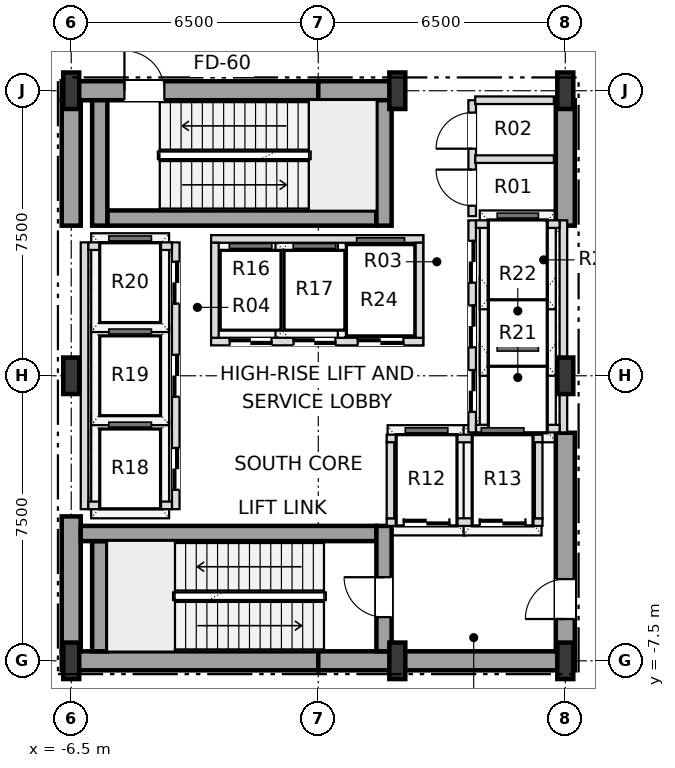
"""IFC4 building model, lengths in metres.
Left out: names, types, materials, properties, quantities, classifications, styles, units other than length and angle.
Written with IfcOpenShell. Run it as: python <this file> out.ifc"""

import sys

from ifc_helpers import new_model, si_unit, direction, frame, frame_2d, origin, origin_2d, place, context, subcontext, project, spatial, rectangle, i_section, extrude, element, fill, save


model = new_model("IFC4")
c1 = context("Model", 3, precision=1e-05, world=origin(), true_north=direction((0.0, 1.0)))
c2 = subcontext(c1, "Body", "Model", "MODEL_VIEW")
j1 = project(units=[si_unit("LENGTHUNIT", "METRE"), si_unit("PLANEANGLEUNIT", "RADIAN")], contexts=[c1])
p1 = place(None, origin())
s1 = spatial("IfcSite", under=j1, at=p1, CompositionType="ELEMENT")
p2 = place(p1, origin())
s2 = spatial("IfcBuilding", under=s1, at=p2, CompositionType="ELEMENT")
p3 = place(p2, frame((0.0, 0.0, 11.4)))
s3 = spatial("IfcBuildingStorey", under=s2, at=p3, CompositionType="ELEMENT", Elevation=11.4)
for number, where, z_axis, x_axis in (
    (1, (-6.5, -7.5, 0.0), (0.0, 0.0, 1.0), (1.0, 0.0, 0.0)),
    (2, (2.08, -7.5, 0.0), (0.0, 0.0, 1.0), (1.0, 0.0, 0.0)),
    (3, (6.5, -7.5, 0.0), (0.0, 0.0, 1.0), (1.0, 0.0, 0.0)),
    (4, (-6.5, 0.0, 0.0), (0.0, 0.0, 1.0), (1.0, 0.0, 0.0)),
    (5, (6.5, 0.0, 0.0), (0.0, 0.0, 1.0), (1.0, 0.0, 0.0)),
    (6, (-6.5, 7.5, 0.0), (0.0, 0.0, 1.0), (1.0, 0.0, 0.0)),
    (7, (2.08, 7.5, 0.0), (0.0, 0.0, 1.0), (1.0, 0.0, 0.0)),
    (8, (6.5, 7.5, 0.0), (0.0, 0.0, 1.0), (1.0, 0.0, 0.0)),
):
    element("IfcColumn", number, at=place(p3, frame(where, z_axis=z_axis, x_axis=x_axis)), inside=s3, PredefinedType="COLUMN", context=c2, shape_type="SweptSolid", body=[
        extrude(i_section(OverallWidth=0.42, OverallDepth=0.96, WebThickness=0.022, FlangeThickness=0.034, at=origin_2d()), origin(), (0.0, 0.0, 1.0), 5.4),
    ])
for number, where, z_axis, x_axis in (
    (9, (-6.75, -7.5, 0.0), (0.0, 0.0, 1.0), (1.0, 0.0, 0.0)),
    (10, (0.0, -7.5, 0.0), (0.0, 0.0, 1.0), (1.0, 0.0, 0.0)),
):
    element("IfcWall", number, at=place(p3, frame(where, z_axis=z_axis, x_axis=x_axis)), inside=s3, PredefinedType="SHEAR", context=c2, shape_type="SweptSolid", body=[
        extrude(rectangle(XDim=6.75, YDim=0.5, at=frame_2d((3.375, 0.0))), origin(), (0.0, 0.0, 1.0), 5.12),
    ])
p4 = place(p3, frame((-6.75, 7.5, 0.0), z_axis=(0.0, 0.0, 1.0), x_axis=(1.0, 0.0, 0.0)))
e11 = element("IfcWall", 11, at=p4, inside=s3, PredefinedType="SHEAR", context=c2, shape_type="SweptSolid", body=[
    extrude(rectangle(XDim=6.75, YDim=0.5, at=frame_2d((3.375, 0.0))), origin(), (0.0, 0.0, 1.0), 5.12),
])
p5 = place(p4, frame((1.65, 0.0, 0.0)))
e12 = element("IfcOpeningElement", 12, at=p5, cuts=e11, PredefinedType="OPENING", context=c2, shape_type="SweptSolid", body=[
    extrude(rectangle(XDim=1.05, YDim=2.15, at=frame_2d((0.525, 1.075))), frame((0.0, 0.26, 0.0), z_axis=(0.0, -1.0, 0.0), x_axis=(1.0, 0.0, 0.0)), (0.0, 0.0, 1.0), 0.52),
])
p6 = place(p3, frame((0.0, 7.5, 0.0), z_axis=(0.0, 0.0, 1.0), x_axis=(1.0, 0.0, 0.0)))
e13 = element("IfcWall", 13, at=p6, inside=s3, PredefinedType="SHEAR", context=c2, shape_type="SweptSolid", body=[
    extrude(rectangle(XDim=2.08, YDim=0.5, at=frame_2d((1.04, 0.0))), origin(), (0.0, 0.0, 1.0), 5.12),
])
p7 = place(p3, frame((-6.5, -7.25, 0.0), z_axis=(0.0, 0.0, 1.0), x_axis=(0.0, 1.0, 0.0)))
e14 = element("IfcWall", 14, at=p7, inside=s3, PredefinedType="SHEAR", context=c2, shape_type="SweptSolid", body=[
    extrude(rectangle(XDim=3.55, YDim=0.5, at=frame_2d((1.775, 0.0))), origin(), (0.0, 0.0, 1.0), 5.12),
])
p8 = place(p3, frame((-6.5, 3.95, 0.0), z_axis=(0.0, 0.0, 1.0), x_axis=(0.0, 1.0, 0.0)))
e15 = element("IfcWall", 15, at=p8, inside=s3, PredefinedType="SHEAR", context=c2, shape_type="SweptSolid", body=[
    extrude(rectangle(XDim=3.3, YDim=0.5, at=frame_2d((1.65, 0.0))), origin(), (0.0, 0.0, 1.0), 5.12),
])
p9 = place(p3, frame((6.5, -7.25, 0.0), z_axis=(0.0, 0.0, 1.0), x_axis=(0.0, 1.0, 0.0)))
e16 = element("IfcWall", 16, at=p9, inside=s3, PredefinedType="SHEAR", context=c2, shape_type="SweptSolid", body=[
    extrude(rectangle(XDim=5.75, YDim=0.5, at=frame_2d((2.875, 0.0))), origin(), (0.0, 0.0, 1.0), 5.12),
])
p10 = place(p9, frame((0.85, 0.0, 0.0)))
e17 = element("IfcOpeningElement", 17, at=p10, cuts=e16, PredefinedType="OPENING", context=c2, shape_type="SweptSolid", body=[
    extrude(rectangle(XDim=1.05, YDim=2.15, at=frame_2d((0.525, 1.075))), frame((0.0, 0.26, 0.0), z_axis=(0.0, -1.0, 0.0), x_axis=(1.0, 0.0, 0.0)), (0.0, 0.0, 1.0), 0.52),
])
p11 = place(p3, frame((6.5, 3.95, 0.0), z_axis=(0.0, 0.0, 1.0), x_axis=(0.0, 1.0, 0.0)))
e18 = element("IfcWall", 18, at=p11, inside=s3, PredefinedType="SHEAR", context=c2, shape_type="SweptSolid", body=[
    extrude(rectangle(XDim=3.3, YDim=0.5, at=frame_2d((1.65, 0.0))), origin(), (0.0, 0.0, 1.0), 5.12),
])
p12 = place(p3, frame((-5.75, -7.25, 0.0), z_axis=(0.0, 0.0, 1.0), x_axis=(0.0, 1.0, 0.0)))
e19 = element("IfcWall", 19, at=p12, inside=s3, PredefinedType="SHEAR", context=c2, shape_type="SweptSolid", body=[
    extrude(rectangle(XDim=2.9, YDim=0.4, at=frame_2d((1.45, 0.0))), origin(), (0.0, 0.0, 1.0), 5.12),
])
p13 = place(p3, frame((-6.25, -4.15, 0.0), z_axis=(0.0, 0.0, 1.0), x_axis=(1.0, 0.0, 0.0)))
e20 = element("IfcWall", 20, at=p13, inside=s3, PredefinedType="SHEAR", context=c2, shape_type="SweptSolid", body=[
    extrude(rectangle(XDim=7.78, YDim=0.4, at=frame_2d((3.89, 0.0))), origin(), (0.0, 0.0, 1.0), 5.12),
])
p14 = place(p3, frame((1.73, -7.25, 0.0), z_axis=(0.0, 0.0, 1.0), x_axis=(0.0, 1.0, 0.0)))
e21 = element("IfcWall", 21, at=p14, inside=s3, PredefinedType="SHEAR", context=c2, shape_type="SweptSolid", body=[
    extrude(rectangle(XDim=3.3, YDim=0.4, at=frame_2d((1.65, 0.0))), origin(), (0.0, 0.0, 1.0), 5.12),
])
p15 = place(p14, frame((0.9, 0.0, 0.0)))
e22 = element("IfcOpeningElement", 22, at=p15, cuts=e21, PredefinedType="OPENING", context=c2, shape_type="SweptSolid", body=[
    extrude(rectangle(XDim=1.05, YDim=2.15, at=frame_2d((0.525, 1.075))), frame((0.0, 0.21, 0.0), z_axis=(0.0, -1.0, 0.0), x_axis=(1.0, 0.0, 0.0)), (0.0, 0.0, 1.0), 0.42),
])
p16 = place(p3, frame((-5.55, 4.15, 0.0), z_axis=(0.0, 0.0, 1.0), x_axis=(1.0, 0.0, 0.0)))
e23 = element("IfcWall", 23, at=p16, inside=s3, PredefinedType="SHEAR", context=c2, shape_type="SweptSolid", body=[
    extrude(rectangle(XDim=7.08, YDim=0.4, at=frame_2d((3.54, 0.0))), origin(), (0.0, 0.0, 1.0), 5.12),
])
for number, where, z_axis, x_axis in (
    (24, (1.73, 3.95, 0.0), (0.0, 0.0, 1.0), (0.0, 1.0, 0.0)),
    (25, (-5.75, 3.95, 0.0), (0.0, 0.0, 1.0), (0.0, 1.0, 0.0)),
):
    element("IfcWall", number, at=place(p3, frame(where, z_axis=z_axis, x_axis=x_axis)), inside=s3, PredefinedType="SHEAR", context=c2, shape_type="SweptSolid", body=[
        extrude(rectangle(XDim=3.3, YDim=0.4, at=frame_2d((1.65, 0.0))), origin(), (0.0, 0.0, 1.0), 5.12),
    ])
p17 = place(p3, frame((-3.75, -3.51, 0.0), z_axis=(0.0, 0.0, 1.0), x_axis=(0.0, 1.0, 0.0)))
e26 = element("IfcWall", 26, at=p17, inside=s3, PredefinedType="SOLIDWALL", context=c2, shape_type="SweptSolid", body=[
    extrude(rectangle(XDim=7.02, YDim=0.2, at=frame_2d((3.51, 0.0))), origin(), (0.0, 0.0, 1.0), 5.12),
])
p18 = place(p17, frame((0.51, 0.0, 0.0)))
e27 = element("IfcOpeningElement", 27, at=p18, cuts=e26, PredefinedType="OPENING", context=c2, shape_type="SweptSolid", body=[
    extrude(rectangle(XDim=1.1, YDim=2.15, at=frame_2d((0.55, 1.075))), frame((0.0, 0.11, 0.0), z_axis=(0.0, -1.0, 0.0), x_axis=(1.0, 0.0, 0.0)), (0.0, 0.0, 1.0), 0.22),
])
p19 = place(p17, frame((2.96, 0.0, 0.0)))
e28 = element("IfcOpeningElement", 28, at=p19, cuts=e26, PredefinedType="OPENING", context=c2, shape_type="SweptSolid", body=[
    extrude(rectangle(XDim=1.1, YDim=2.15, at=frame_2d((0.55, 1.075))), frame((0.0, 0.11, 0.0), z_axis=(0.0, -1.0, 0.0), x_axis=(1.0, 0.0, 0.0)), (0.0, 0.0, 1.0), 0.22),
])
p20 = place(p17, frame((5.41, 0.0, 0.0)))
e29 = element("IfcOpeningElement", 29, at=p20, cuts=e26, PredefinedType="OPENING", context=c2, shape_type="SweptSolid", body=[
    extrude(rectangle(XDim=1.1, YDim=2.15, at=frame_2d((0.55, 1.075))), frame((0.0, 0.11, 0.0), z_axis=(0.0, -1.0, 0.0), x_axis=(1.0, 0.0, 0.0)), (0.0, 0.0, 1.0), 0.22),
])
p21 = place(p3, frame((-6.15, -3.51, 0.0), z_axis=(0.0, 0.0, 1.0), x_axis=(0.0, 1.0, 0.0)))
e30 = element("IfcWall", 30, at=p21, inside=s3, PredefinedType="SOLIDWALL", context=c2, shape_type="SweptSolid", body=[
    extrude(rectangle(XDim=7.02, YDim=0.2, at=frame_2d((3.51, 0.0))), origin(), (0.0, 0.0, 1.0), 5.12),
])
for number, where, z_axis, x_axis in (
    (31, (-6.05, -3.41, 0.0), (0.0, 0.0, 1.0), (1.0, 0.0, 0.0)),
    (32, (-6.05, 3.41, 0.0), (0.0, 0.0, 1.0), (1.0, 0.0, 0.0)),
):
    element("IfcWall", number, at=place(p3, frame(where, z_axis=z_axis, x_axis=x_axis)), inside=s3, PredefinedType="SOLIDWALL", context=c2, shape_type="SweptSolid", body=[
        extrude(rectangle(XDim=2.2, YDim=0.2, at=frame_2d((1.1, 0.0))), origin(), (0.0, 0.0, 1.0), 5.12),
    ])
p22 = place(p3, frame((4.05, -1.49, 0.0), z_axis=(0.0, 0.0, 1.0), x_axis=(0.0, 1.0, 0.0)))
e33 = element("IfcWall", 33, at=p22, inside=s3, PredefinedType="SOLIDWALL", context=c2, shape_type="SweptSolid", body=[
    extrude(rectangle(XDim=5.58, YDim=0.2, at=frame_2d((2.79, 0.0))), origin(), (0.0, 0.0, 1.0), 5.12),
])
p23 = place(p22, frame((0.54, 0.0, 0.0)))
e34 = element("IfcOpeningElement", 34, at=p23, cuts=e33, PredefinedType="OPENING", context=c2, shape_type="SweptSolid", body=[
    extrude(rectangle(XDim=1.1, YDim=2.15, at=frame_2d((0.55, 1.075))), frame((0.0, 0.11, 0.0), z_axis=(0.0, -1.0, 0.0), x_axis=(1.0, 0.0, 0.0)), (0.0, 0.0, 1.0), 0.22),
])
p24 = place(p22, frame((2.24, 0.0, 0.0)))
e35 = element("IfcOpeningElement", 35, at=p24, cuts=e33, PredefinedType="OPENING", context=c2, shape_type="SweptSolid", body=[
    extrude(rectangle(XDim=1.1, YDim=2.15, at=frame_2d((0.55, 1.075))), frame((0.0, 0.11, 0.0), z_axis=(0.0, -1.0, 0.0), x_axis=(1.0, 0.0, 0.0)), (0.0, 0.0, 1.0), 0.22),
])
p25 = place(p22, frame((3.94, 0.0, 0.0)))
e36 = element("IfcOpeningElement", 36, at=p25, cuts=e33, PredefinedType="OPENING", context=c2, shape_type="SweptSolid", body=[
    extrude(rectangle(XDim=1.1, YDim=2.15, at=frame_2d((0.55, 1.075))), frame((0.0, 0.11, 0.0), z_axis=(0.0, -1.0, 0.0), x_axis=(1.0, 0.0, 0.0)), (0.0, 0.0, 1.0), 0.22),
])
p26 = place(p3, frame((6.45, -1.49, 0.0), z_axis=(0.0, 0.0, 1.0), x_axis=(0.0, 1.0, 0.0)))
e37 = element("IfcWall", 37, at=p26, inside=s3, PredefinedType="SOLIDWALL", context=c2, shape_type="SweptSolid", body=[
    extrude(rectangle(XDim=5.58, YDim=0.2, at=frame_2d((2.79, 0.0))), origin(), (0.0, 0.0, 1.0), 4.41),
])
for number, where, z_axis, x_axis in (
    (38, (4.15, -1.39, 0.0), (0.0, 0.0, 1.0), (1.0, 0.0, 0.0)),
    (39, (4.15, 3.99, 0.0), (0.0, 0.0, 1.0), (1.0, 0.0, 0.0)),
):
    element("IfcWall", number, at=place(p3, frame(where, z_axis=z_axis, x_axis=x_axis)), inside=s3, PredefinedType="SOLIDWALL", context=c2, shape_type="SweptSolid", body=[
        extrude(rectangle(XDim=2.2, YDim=0.2, at=frame_2d((1.1, 0.0))), origin(), (0.0, 0.0, 1.0), 5.12),
    ])
p27 = place(p3, frame((-2.82, 0.9, 0.0), z_axis=(0.0, 0.0, 1.0), x_axis=(1.0, 0.0, 0.0)))
e40 = element("IfcWall", 40, at=p27, inside=s3, PredefinedType="SOLIDWALL", context=c2, shape_type="SweptSolid", body=[
    extrude(rectangle(XDim=5.58, YDim=0.2, at=frame_2d((2.79, 0.0))), origin(), (0.0, 0.0, 1.0), 5.12),
])
p28 = place(p27, frame((0.49, 0.0, 0.0)))
e41 = element("IfcOpeningElement", 41, at=p28, cuts=e40, PredefinedType="OPENING", context=c2, shape_type="SweptSolid", body=[
    extrude(rectangle(XDim=1.1, YDim=2.15, at=frame_2d((0.55, 1.075))), frame((0.0, 0.11, 0.0), z_axis=(0.0, -1.0, 0.0), x_axis=(1.0, 0.0, 0.0)), (0.0, 0.0, 1.0), 0.22),
])
p29 = place(p27, frame((2.17, 0.0, 0.0)))
e42 = element("IfcOpeningElement", 42, at=p29, cuts=e40, PredefinedType="OPENING", context=c2, shape_type="SweptSolid", body=[
    extrude(rectangle(XDim=1.1, YDim=2.15, at=frame_2d((0.55, 1.075))), frame((0.0, 0.11, 0.0), z_axis=(0.0, -1.0, 0.0), x_axis=(1.0, 0.0, 0.0)), (0.0, 0.0, 1.0), 0.22),
])
p30 = place(p27, frame((3.86, 0.0, 0.0)))
e43 = element("IfcOpeningElement", 43, at=p30, cuts=e40, PredefinedType="OPENING", context=c2, shape_type="SweptSolid", body=[
    extrude(rectangle(XDim=1.2, YDim=2.2, at=frame_2d((0.6, 1.1))), frame((0.0, 0.11, 0.0), z_axis=(0.0, -1.0, 0.0), x_axis=(1.0, 0.0, 0.0)), (0.0, 0.0, 1.0), 0.22),
])
p31 = place(p3, frame((-2.82, 3.6, 0.0), z_axis=(0.0, 0.0, 1.0), x_axis=(1.0, 0.0, 0.0)))
e44 = element("IfcWall", 44, at=p31, inside=s3, PredefinedType="SOLIDWALL", context=c2, shape_type="SweptSolid", body=[
    extrude(rectangle(XDim=5.58, YDim=0.2, at=frame_2d((2.79, 0.0))), origin(), (0.0, 0.0, 1.0), 5.12),
])
for number, where, z_axis, x_axis in (
    (45, (-2.72, 1.0, 0.0), (0.0, 0.0, 1.0), (0.0, 1.0, 0.0)),
    (46, (2.66, 1.0, 0.0), (0.0, 0.0, 1.0), (0.0, 1.0, 0.0)),
):
    element("IfcWall", number, at=place(p3, frame(where, z_axis=z_axis, x_axis=x_axis)), inside=s3, PredefinedType="SOLIDWALL", context=c2, shape_type="SweptSolid", body=[
        extrude(rectangle(XDim=2.5, YDim=0.2, at=frame_2d((1.25, 0.0))), origin(), (0.0, 0.0, 1.0), 5.12),
    ])
p32 = place(p3, frame((1.8, -3.85, 0.0), z_axis=(0.0, 0.0, 1.0), x_axis=(1.0, 0.0, 0.0)))
e47 = element("IfcWall", 47, at=p32, inside=s3, PredefinedType="SOLIDWALL", context=c2, shape_type="SweptSolid", body=[
    extrude(rectangle(XDim=4.1, YDim=0.2, at=frame_2d((2.05, 0.0))), origin(), (0.0, 0.0, 1.0), 5.12),
])
p33 = place(p32, frame((0.45, 0.0, 0.0)))
e48 = element("IfcOpeningElement", 48, at=p33, cuts=e47, PredefinedType="OPENING", context=c2, shape_type="SweptSolid", body=[
    extrude(rectangle(XDim=1.2, YDim=2.2, at=frame_2d((0.6, 1.1))), frame((0.0, 0.11, 0.0), z_axis=(0.0, -1.0, 0.0), x_axis=(1.0, 0.0, 0.0)), (0.0, 0.0, 1.0), 0.22),
])
p34 = place(p32, frame((2.45, 0.0, 0.0)))
e49 = element("IfcOpeningElement", 49, at=p34, cuts=e47, PredefinedType="OPENING", context=c2, shape_type="SweptSolid", body=[
    extrude(rectangle(XDim=1.2, YDim=2.2, at=frame_2d((0.6, 1.1))), frame((0.0, 0.11, 0.0), z_axis=(0.0, -1.0, 0.0), x_axis=(1.0, 0.0, 0.0)), (0.0, 0.0, 1.0), 0.22),
])
p35 = place(p3, frame((1.8, -1.65, 0.0), z_axis=(0.0, 0.0, 1.0), x_axis=(1.0, 0.0, 0.0)))
e50 = element("IfcWall", 50, at=p35, inside=s3, PredefinedType="SOLIDWALL", context=c2, shape_type="SweptSolid", body=[
    extrude(rectangle(XDim=4.1, YDim=0.2, at=frame_2d((2.05, 0.0))), origin(), (0.0, 0.0, 1.0), 5.12),
])
for number, where, z_axis, x_axis in (
    (51, (1.9, -3.75, 0.0), (0.0, 0.0, 1.0), (0.0, 1.0, 0.0)),
    (52, (5.8, -3.75, 0.0), (0.0, 0.0, 1.0), (0.0, 1.0, 0.0)),
):
    element("IfcWall", number, at=place(p3, frame(where, z_axis=z_axis, x_axis=x_axis)), inside=s3, PredefinedType="SOLIDWALL", context=c2, shape_type="SweptSolid", body=[
        extrude(rectangle(XDim=2.0, YDim=0.2, at=frame_2d((1.0, 0.0))), origin(), (0.0, 0.0, 1.0), 5.12),
    ])
p36 = place(p3, frame((4.05, 4.2, 0.0), z_axis=(0.0, 0.0, 1.0), x_axis=(0.0, 1.0, 0.0)))
e53 = element("IfcWall", 53, at=p36, inside=s3, PredefinedType="SOLIDWALL", context=c2, shape_type="SweptSolid", body=[
    extrude(rectangle(XDim=3.05, YDim=0.2, at=frame_2d((1.525, 0.0))), origin(), (0.0, 0.0, 1.0), 5.12),
])
p37 = place(p36, frame((0.275, 0.0, 0.0)))
e54 = element("IfcOpeningElement", 54, at=p37, cuts=e53, PredefinedType="OPENING", context=c2, shape_type="SweptSolid", body=[
    extrude(rectangle(XDim=0.95, YDim=2.15, at=frame_2d((0.475, 1.075))), frame((0.0, 0.11, 0.0), z_axis=(0.0, -1.0, 0.0), x_axis=(1.0, 0.0, 0.0)), (0.0, 0.0, 1.0), 0.22),
])
p38 = place(p36, frame((1.775, 0.0, 0.0)))
e55 = element("IfcOpeningElement", 55, at=p38, cuts=e53, PredefinedType="OPENING", context=c2, shape_type="SweptSolid", body=[
    extrude(rectangle(XDim=0.95, YDim=2.15, at=frame_2d((0.475, 1.075))), frame((0.0, 0.11, 0.0), z_axis=(0.0, -1.0, 0.0), x_axis=(1.0, 0.0, 0.0)), (0.0, 0.0, 1.0), 0.22),
])
p39 = place(p3, frame((4.13, 5.7, 0.0), z_axis=(0.0, 0.0, 1.0), x_axis=(1.0, 0.0, 0.0)))
e56 = element("IfcWall", 56, at=p39, inside=s3, PredefinedType="SOLIDWALL", context=c2, shape_type="SweptSolid", body=[
    extrude(rectangle(XDim=2.07, YDim=0.2, at=frame_2d((1.035, 0.0))), origin(), (0.0, 0.0, 1.0), 5.12),
])
p40 = place(p3, frame((4.13, 7.25, 0.0), z_axis=(0.0, 0.0, 1.0), x_axis=(1.0, 0.0, 0.0)))
e57 = element("IfcWall", 57, at=p40, inside=s3, PredefinedType="SOLIDWALL", context=c2, shape_type="SweptSolid", body=[
    extrude(rectangle(XDim=2.07, YDim=0.2, at=frame_2d((1.035, 0.0))), origin(), (0.0, 0.0, 1.0), 4.41),
])
p41 = place(p10, origin())
e58 = element("IfcDoor", 58, at=p41, inside=s3, OperationType="SINGLE_SWING_LEFT", PredefinedType="DOOR", context=c2, shape_type="SweptSolid", body=[
    extrude(rectangle(XDim=1.05, YDim=2.15, at=frame_2d((0.525, 1.075))), frame((0.0, 0.025, 0.0), z_axis=(0.0, -1.0, 0.0), x_axis=(1.0, 0.0, 0.0)), (0.0, 0.0, 1.0), 0.05),
])
fill(e17, e58)
p42 = place(p15, origin())
e59 = element("IfcDoor", 59, at=p42, inside=s3, OperationType="SINGLE_SWING_RIGHT", PredefinedType="DOOR", context=c2, shape_type="SweptSolid", body=[
    extrude(rectangle(XDim=1.05, YDim=2.15, at=frame_2d((0.525, 1.075))), frame((0.0, 0.025, 0.0), z_axis=(0.0, -1.0, 0.0), x_axis=(1.0, 0.0, 0.0)), (0.0, 0.0, 1.0), 0.05),
])
fill(e22, e59)
p43 = place(p5, origin())
e60 = element("IfcDoor", 60, at=p43, inside=s3, OperationType="SINGLE_SWING_LEFT", PredefinedType="DOOR", context=c2, shape_type="SweptSolid", body=[
    extrude(rectangle(XDim=1.05, YDim=2.15, at=frame_2d((0.525, 1.075))), frame((0.0, 0.025, 0.0), z_axis=(0.0, -1.0, 0.0), x_axis=(1.0, 0.0, 0.0)), (0.0, 0.0, 1.0), 0.05),
])
fill(e12, e60)
p44 = place(p18, origin())
e61 = element("IfcDoor", 61, at=p44, inside=s3, OperationType="DOUBLE_DOOR_SLIDING", PredefinedType="DOOR", context=c2, shape_type="SweptSolid", body=[
    extrude(rectangle(XDim=1.1, YDim=2.15, at=frame_2d((0.55, 1.075))), frame((0.0, 0.025, 0.0), z_axis=(0.0, -1.0, 0.0), x_axis=(1.0, 0.0, 0.0)), (0.0, 0.0, 1.0), 0.05),
])
fill(e27, e61)
p45 = place(p19, origin())
e62 = element("IfcDoor", 62, at=p45, inside=s3, OperationType="DOUBLE_DOOR_SLIDING", PredefinedType="DOOR", context=c2, shape_type="SweptSolid", body=[
    extrude(rectangle(XDim=1.1, YDim=2.15, at=frame_2d((0.55, 1.075))), frame((0.0, 0.025, 0.0), z_axis=(0.0, -1.0, 0.0), x_axis=(1.0, 0.0, 0.0)), (0.0, 0.0, 1.0), 0.05),
])
fill(e28, e62)
p46 = place(p20, origin())
e63 = element("IfcDoor", 63, at=p46, inside=s3, OperationType="DOUBLE_DOOR_SLIDING", PredefinedType="DOOR", context=c2, shape_type="SweptSolid", body=[
    extrude(rectangle(XDim=1.1, YDim=2.15, at=frame_2d((0.55, 1.075))), frame((0.0, 0.025, 0.0), z_axis=(0.0, -1.0, 0.0), x_axis=(1.0, 0.0, 0.0)), (0.0, 0.0, 1.0), 0.05),
])
fill(e29, e63)
p47 = place(p23, origin())
e64 = element("IfcDoor", 64, at=p47, inside=s3, OperationType="DOUBLE_DOOR_SLIDING", PredefinedType="DOOR", context=c2, shape_type="SweptSolid", body=[
    extrude(rectangle(XDim=1.1, YDim=2.15, at=frame_2d((0.55, 1.075))), frame((0.0, 0.025, 0.0), z_axis=(0.0, -1.0, 0.0), x_axis=(1.0, 0.0, 0.0)), (0.0, 0.0, 1.0), 0.05),
])
fill(e34, e64)
p48 = place(p24, origin())
e65 = element("IfcDoor", 65, at=p48, inside=s3, OperationType="DOUBLE_DOOR_SLIDING", PredefinedType="DOOR", context=c2, shape_type="SweptSolid", body=[
    extrude(rectangle(XDim=1.1, YDim=2.15, at=frame_2d((0.55, 1.075))), frame((0.0, 0.025, 0.0), z_axis=(0.0, -1.0, 0.0), x_axis=(1.0, 0.0, 0.0)), (0.0, 0.0, 1.0), 0.05),
])
fill(e35, e65)
p49 = place(p25, origin())
e66 = element("IfcDoor", 66, at=p49, inside=s3, OperationType="DOUBLE_DOOR_SLIDING", PredefinedType="DOOR", context=c2, shape_type="SweptSolid", body=[
    extrude(rectangle(XDim=1.1, YDim=2.15, at=frame_2d((0.55, 1.075))), frame((0.0, 0.025, 0.0), z_axis=(0.0, -1.0, 0.0), x_axis=(1.0, 0.0, 0.0)), (0.0, 0.0, 1.0), 0.05),
])
fill(e36, e66)
p50 = place(p28, origin())
e67 = element("IfcDoor", 67, at=p50, inside=s3, OperationType="DOUBLE_DOOR_SLIDING", PredefinedType="DOOR", context=c2, shape_type="SweptSolid", body=[
    extrude(rectangle(XDim=1.1, YDim=2.15, at=frame_2d((0.55, 1.075))), frame((0.0, 0.025, 0.0), z_axis=(0.0, -1.0, 0.0), x_axis=(1.0, 0.0, 0.0)), (0.0, 0.0, 1.0), 0.05),
])
fill(e41, e67)
p51 = place(p29, origin())
e68 = element("IfcDoor", 68, at=p51, inside=s3, OperationType="DOUBLE_DOOR_SLIDING", PredefinedType="DOOR", context=c2, shape_type="SweptSolid", body=[
    extrude(rectangle(XDim=1.1, YDim=2.15, at=frame_2d((0.55, 1.075))), frame((0.0, 0.025, 0.0), z_axis=(0.0, -1.0, 0.0), x_axis=(1.0, 0.0, 0.0)), (0.0, 0.0, 1.0), 0.05),
])
fill(e42, e68)
p52 = place(p30, origin())
e69 = element("IfcDoor", 69, at=p52, inside=s3, OperationType="DOUBLE_DOOR_SLIDING", PredefinedType="DOOR", context=c2, shape_type="SweptSolid", body=[
    extrude(rectangle(XDim=1.2, YDim=2.2, at=frame_2d((0.6, 1.1))), frame((0.0, 0.025, 0.0), z_axis=(0.0, -1.0, 0.0), x_axis=(1.0, 0.0, 0.0)), (0.0, 0.0, 1.0), 0.05),
])
fill(e43, e69)
p53 = place(p33, origin())
e70 = element("IfcDoor", 70, at=p53, inside=s3, OperationType="DOUBLE_DOOR_SLIDING", PredefinedType="DOOR", context=c2, shape_type="SweptSolid", body=[
    extrude(rectangle(XDim=1.2, YDim=2.2, at=frame_2d((0.6, 1.1))), frame((0.0, 0.025, 0.0), z_axis=(0.0, -1.0, 0.0), x_axis=(1.0, 0.0, 0.0)), (0.0, 0.0, 1.0), 0.05),
])
fill(e48, e70)
p54 = place(p34, origin())
e71 = element("IfcDoor", 71, at=p54, inside=s3, OperationType="DOUBLE_DOOR_SLIDING", PredefinedType="DOOR", context=c2, shape_type="SweptSolid", body=[
    extrude(rectangle(XDim=1.2, YDim=2.2, at=frame_2d((0.6, 1.1))), frame((0.0, 0.025, 0.0), z_axis=(0.0, -1.0, 0.0), x_axis=(1.0, 0.0, 0.0)), (0.0, 0.0, 1.0), 0.05),
])
fill(e49, e71)
p55 = place(p37, origin())
e72 = element("IfcDoor", 72, at=p55, inside=s3, OperationType="SINGLE_SWING_RIGHT", PredefinedType="DOOR", context=c2, shape_type="SweptSolid", body=[
    extrude(rectangle(XDim=0.95, YDim=2.15, at=frame_2d((0.475, 1.075))), frame((0.0, 0.025, 0.0), z_axis=(0.0, -1.0, 0.0), x_axis=(1.0, 0.0, 0.0)), (0.0, 0.0, 1.0), 0.05),
])
fill(e54, e72)
p56 = place(p38, origin())
e73 = element("IfcDoor", 73, at=p56, inside=s3, OperationType="SINGLE_SWING_LEFT", PredefinedType="DOOR", context=c2, shape_type="SweptSolid", body=[
    extrude(rectangle(XDim=0.95, YDim=2.15, at=frame_2d((0.475, 1.075))), frame((0.0, 0.025, 0.0), z_axis=(0.0, -1.0, 0.0), x_axis=(1.0, 0.0, 0.0)), (0.0, 0.0, 1.0), 0.05),
])
fill(e55, e73)
save(model, sys.argv[1])
